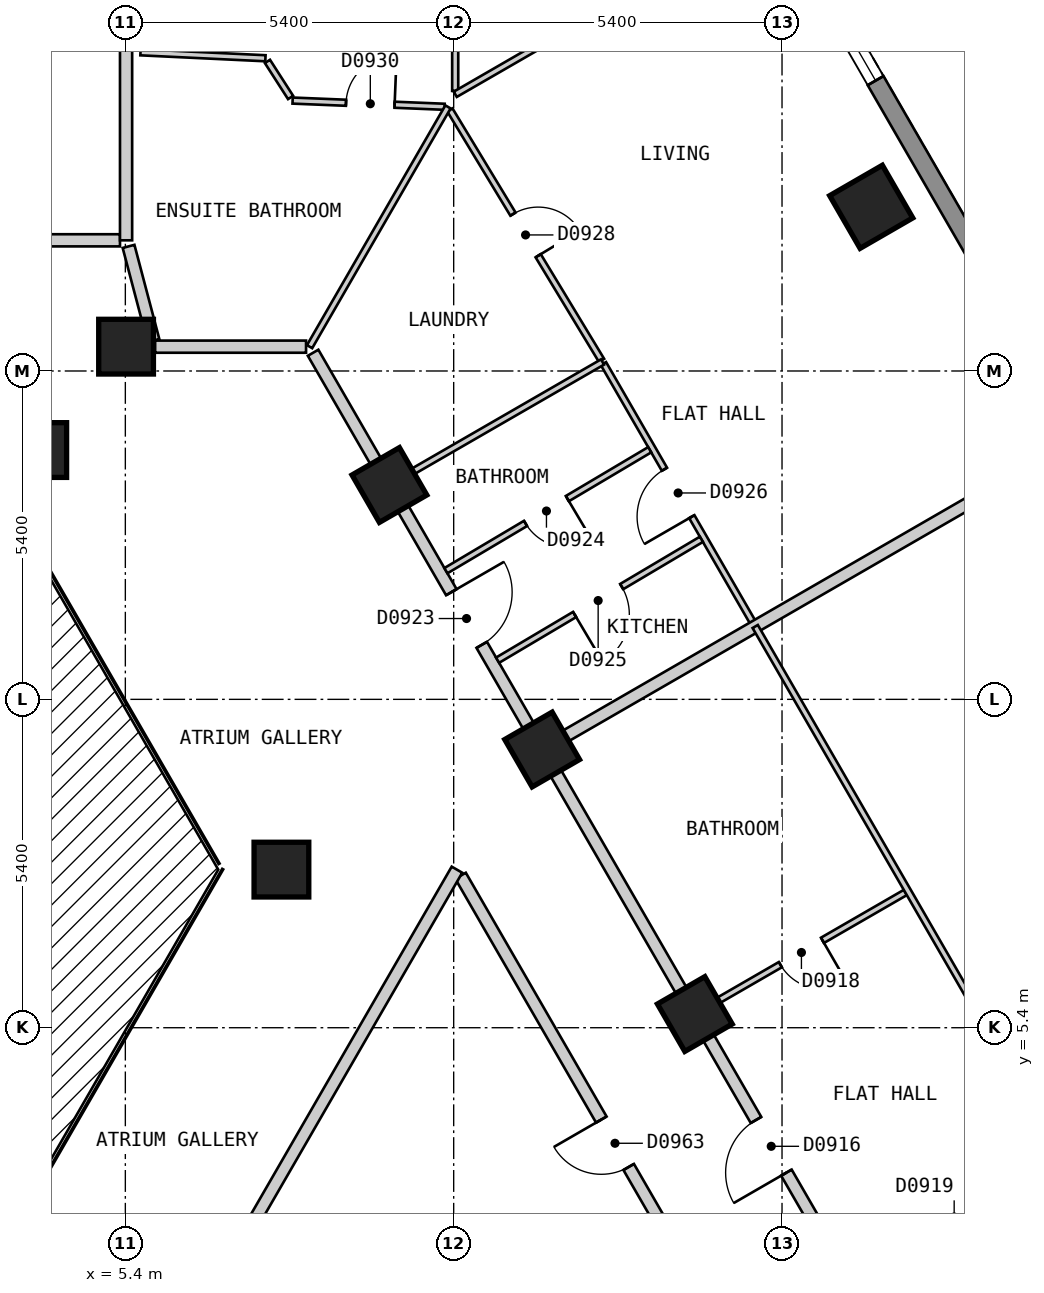
"""IFC4 building model, lengths in metres.
Left out: names, types, materials, properties, quantities, classifications, styles, units other than length and angle.
Written with IfcOpenShell. Run it as: python <this file> out.ifc"""

import sys

from ifc_helpers import new_model, si_unit, direction, frame, frame_2d, origin, origin_2d, place, context, subcontext, project, spatial, polyline, rectangle, outline, extrude, element, fill, save


model = new_model("IFC4")
c1 = context("Model", 3, precision=1e-05, world=origin(), true_north=direction((0.0, 1.0)))
c2 = subcontext(c1, "Body", "Model", "MODEL_VIEW")
j1 = project(units=[si_unit("LENGTHUNIT", "METRE"), si_unit("PLANEANGLEUNIT", "RADIAN")], contexts=[c1])
p1 = place(None, origin())
s1 = spatial("IfcSite", under=j1, at=p1, CompositionType="ELEMENT")
p2 = place(p1, origin())
s2 = spatial("IfcBuilding", under=s1, at=p2, CompositionType="ELEMENT")
p3 = place(p2, frame((0.0, 0.0, 90.0)))
s3 = spatial("IfcBuildingStorey", under=s2, at=p3, CompositionType="ELEMENT", Elevation=90.0)
p4 = place(p3, frame((17.667, 18.9, 0.0), z_axis=(0.0, 0.0, 1.0), x_axis=(-0.5, 0.866025403784, 0.0)))
e1 = element("IfcColumn", 1, at=p4, inside=s3, PredefinedType="COLUMN", context=c2, shape_type="SweptSolid", body=[
    extrude(rectangle(XDim=1.0, YDim=1.0, at=origin_2d()), origin(), (0.0, 0.0, 1.0), 3.0),
])
for number, where, z_axis, x_axis in (
    (2, (14.766, 5.625, 0.0), (0.0, 0.0, 1.0), (-0.5, 0.866, 0.0)),
    (3, (12.255, 9.975, 0.0), (0.0, 0.0, 1.0), (-0.5, 0.866, 0.0)),
    (4, (7.967, 8.0, 0.0), (0.0, 0.0, 1.0), (1.0, 0.0, 0.0)),
    (5, (9.743, 14.325, 0.0), (0.0, 0.0, 1.0), (-0.5, 0.866, 0.0)),
    (6, (5.412, 16.6, 0.0), (0.0, 0.0, 1.0), (-1.0, 0.0, 0.0)),
    (7, (3.984, 14.9, 0.0), (0.0, 0.0, 1.0), (1.0, 0.0, 0.0)),
):
    element("IfcColumn", number, at=place(p3, frame(where, z_axis=z_axis, x_axis=x_axis)), inside=s3, PredefinedType="COLUMN", context=c2, shape_type="SweptSolid", body=[
        extrude(rectangle(XDim=0.9, YDim=0.9, at=origin_2d()), origin(), (0.0, 0.0, 1.0), 3.0),
    ])
p5 = place(p3, frame((29.027, 1.425, 0.0), z_axis=(0.0, 0.0, 1.0), x_axis=(-0.500027479704, 0.866009537788, 0.0)))
e8 = element("IfcWall", 8, at=p5, inside=s3, PredefinedType="SOLIDWALL", context=c2, shape_type="SweptSolid", body=[
    extrude(outline(polyline([(0.0, -0.15), (26.559, -0.15), (26.478, 0.15), (0.08, 0.15), (0.0, -0.15)])), origin(), (0.0, 0.0, 1.0), 2.7),
])
p6 = place(p5, frame((2.483, 0.0, 0.15)))
e9 = element("IfcOpeningElement", 9, at=p6, cuts=e8, PredefinedType="OPENING", context=c2, shape_type="SweptSolid", body=[
    extrude(rectangle(XDim=1.5, YDim=2.1, at=frame_2d((0.75, 1.05))), frame((0.0, 0.16, 0.0), z_axis=(0.0, -1.0, 0.0), x_axis=(1.0, 0.0, 0.0)), (0.0, 0.0, 1.0), 0.32),
])
p7 = place(p5, frame((7.506, 0.0, 0.15)))
e10 = element("IfcOpeningElement", 10, at=p7, cuts=e8, PredefinedType="OPENING", context=c2, shape_type="SweptSolid", body=[
    extrude(rectangle(XDim=1.5, YDim=2.1, at=frame_2d((0.75, 1.05))), frame((0.0, 0.16, 0.0), z_axis=(0.0, -1.0, 0.0), x_axis=(1.0, 0.0, 0.0)), (0.0, 0.0, 1.0), 0.32),
])
p8 = place(p5, frame((12.529, 0.0, 0.15)))
e11 = element("IfcOpeningElement", 11, at=p8, cuts=e8, PredefinedType="OPENING", context=c2, shape_type="SweptSolid", body=[
    extrude(rectangle(XDim=1.5, YDim=2.1, at=frame_2d((0.75, 1.05))), frame((0.0, 0.16, 0.0), z_axis=(0.0, -1.0, 0.0), x_axis=(1.0, 0.0, 0.0)), (0.0, 0.0, 1.0), 0.32),
])
p9 = place(p5, frame((17.552, 0.0, 0.15)))
e12 = element("IfcOpeningElement", 12, at=p9, cuts=e8, PredefinedType="OPENING", context=c2, shape_type="SweptSolid", body=[
    extrude(rectangle(XDim=1.5, YDim=2.1, at=frame_2d((0.75, 1.05))), frame((0.0, 0.16, 0.0), z_axis=(0.0, -1.0, 0.0), x_axis=(1.0, 0.0, 0.0)), (0.0, 0.0, 1.0), 0.32),
])
p10 = place(p5, frame((22.575, 0.0, 0.15)))
e13 = element("IfcOpeningElement", 13, at=p10, cuts=e8, PredefinedType="OPENING", context=c2, shape_type="SweptSolid", body=[
    extrude(rectangle(XDim=1.5, YDim=2.1, at=frame_2d((0.75, 1.05))), frame((0.0, 0.16, 0.0), z_axis=(0.0, -1.0, 0.0), x_axis=(1.0, 0.0, 0.0)), (0.0, 0.0, 1.0), 0.32),
])
p11 = place(p3, frame((5.453, 18.249, 0.0), z_axis=(0.0, 0.0, 1.0), x_axis=(0.255385747764, -0.966839241983, 0.0)))
e14 = element("IfcWall", 14, at=p11, inside=s3, PredefinedType="PARTITIONING", context=c2, shape_type="SweptSolid", body=[
    extrude(rectangle(XDim=1.602, YDim=0.2, at=frame_2d((0.801, 0.0))), origin(), (0.0, 0.0, 1.0), 2.7),
])
p12 = place(p3, frame((10.913, 7.899, 0.0), z_axis=(0.0, 0.0, 1.0), x_axis=(0.500028940566, -0.866008694296, 0.0)))
e15 = element("IfcWall", 15, at=p12, inside=s3, PredefinedType="PARTITIONING", context=c2, shape_type="SweptSolid", body=[
    extrude(rectangle(XDim=10.159, YDim=0.2, at=frame_2d((5.08, 0.0))), origin(), (0.0, 0.0, 1.0), 2.7),
])
p13 = place(p12, frame((4.63, 0.0, 0.0)))
e16 = element("IfcOpeningElement", 16, at=p13, cuts=e15, PredefinedType="OPENING", context=c2, shape_type="SweptSolid", body=[
    extrude(rectangle(XDim=0.9, YDim=2.1, at=frame_2d((0.45, 1.05))), frame((0.0, 0.11, 0.0), z_axis=(0.0, -1.0, 0.0), x_axis=(1.0, 0.0, 0.0)), (0.0, 0.0, 1.0), 0.22),
])
p14 = place(p3, frame((8.488, 16.5, 0.0), z_axis=(0.0, 0.0, 1.0), x_axis=(0.499986836607, -0.86603300354, 0.0)))
e17 = element("IfcWall", 17, at=p14, inside=s3, PredefinedType="PARTITIONING", context=c2, shape_type="SweptSolid", body=[
    extrude(rectangle(XDim=20.09, YDim=0.2, at=frame_2d((10.045, 0.0))), origin(), (0.0, 0.0, 1.0), 2.7),
])
p15 = place(p14, frame((14.569, 0.0, 0.0)))
e18 = element("IfcOpeningElement", 18, at=p15, cuts=e17, PredefinedType="OPENING", context=c2, shape_type="SweptSolid", body=[
    extrude(rectangle(XDim=1.0, YDim=2.1, at=frame_2d((0.5, 1.05))), frame((0.0, 0.11, 0.0), z_axis=(0.0, -1.0, 0.0), x_axis=(1.0, 0.0, 0.0)), (0.0, 0.0, 1.0), 0.22),
])
p16 = place(p14, frame((4.547, 0.0, 0.0)))
e19 = element("IfcOpeningElement", 19, at=p16, cuts=e17, PredefinedType="OPENING", context=c2, shape_type="SweptSolid", body=[
    extrude(rectangle(XDim=1.0, YDim=2.1, at=frame_2d((0.5, 1.05))), frame((0.0, 0.11, 0.0), z_axis=(0.0, -1.0, 0.0), x_axis=(1.0, 0.0, 0.0)), (0.0, 0.0, 1.0), 0.22),
])
p17 = place(p3, frame((5.889, 16.6, 0.0), z_axis=(0.0, 0.0, 1.0), x_axis=(1.0, 0.0, 0.0)))
e20 = element("IfcWall", 20, at=p17, inside=s3, PredefinedType="PARTITIONING", context=c2, shape_type="SweptSolid", body=[
    extrude(rectangle(XDim=2.483, YDim=0.2, at=frame_2d((1.242, 0.0))), origin(), (0.0, 0.0, 1.0), 2.7),
])
p18 = place(p3, frame((1.75, 18.349, 0.0), z_axis=(0.0, 0.0, 1.0), x_axis=(1.0, 0.0, 0.0)))
e21 = element("IfcWall", 21, at=p18, inside=s3, PredefinedType="PARTITIONING", context=c2, shape_type="SweptSolid", body=[
    extrude(rectangle(XDim=3.562, YDim=0.2, at=frame_2d((1.781, 0.0))), origin(), (0.0, 0.0, 1.0), 2.7),
])
p19 = place(p3, frame((6.928, 1.2, 0.0), z_axis=(0.0, 0.0, 1.0), x_axis=(0.500055327065, 0.865993458332, 0.0)))
e22 = element("IfcWall", 22, at=p19, inside=s3, PredefinedType="PARTITIONING", context=c2, shape_type="SweptSolid", body=[
    extrude(rectangle(XDim=7.851, YDim=0.2, at=frame_2d((3.926, 0.0))), origin(), (0.0, 0.0, 1.0), 2.7),
])
p20 = place(p3, frame((7.737, 21.291, 0.0), z_axis=(0.0, 0.0, 1.0), x_axis=(0.540389876456, -0.841414749944, 0.0)))
e23 = element("IfcWall", 23, at=p20, inside=s3, PredefinedType="PARTITIONING", context=c2, shape_type="SweptSolid", body=[
    extrude(rectangle(XDim=0.705, YDim=0.1, at=frame_2d((0.353, 0.0))), origin(), (0.0, 0.0, 1.0), 2.7),
])
p21 = place(p3, frame((10.738, 20.492, 0.0), z_axis=(0.0, 0.0, 1.0), x_axis=(0.518026330534, -0.85536467128, 0.0)))
e24 = element("IfcWall", 24, at=p21, inside=s3, PredefinedType="PARTITIONING", context=c2, shape_type="SweptSolid", body=[
    extrude(rectangle(XDim=4.814, YDim=0.1, at=frame_2d((2.407, 0.0))), origin(), (0.0, 0.0, 1.0), 2.7),
])
p22 = place(p21, frame((2.002, 0.0, 0.0)))
e25 = element("IfcOpeningElement", 25, at=p22, cuts=e24, PredefinedType="OPENING", context=c2, shape_type="SweptSolid", body=[
    extrude(rectangle(XDim=0.8, YDim=2.1, at=frame_2d((0.4, 1.05))), frame((0.0, 0.06, 0.0), z_axis=(0.0, -1.0, 0.0), x_axis=(1.0, 0.0, 0.0)), (0.0, 0.0, 1.0), 0.12),
])
p23 = place(p3, frame((13.263, 16.322, 0.0), z_axis=(0.0, 0.0, 1.0), x_axis=(0.499946798379, -0.866056117576, 0.0)))
e26 = element("IfcWall", 26, at=p23, inside=s3, PredefinedType="PARTITIONING", context=c2, shape_type="SweptSolid", body=[
    extrude(rectangle(XDim=4.993, YDim=0.1, at=frame_2d((2.496, 0.0))), origin(), (0.0, 0.0, 1.0), 2.7),
])
p24 = place(p23, frame((2.007, 0.0, 0.0)))
e27 = element("IfcOpeningElement", 27, at=p24, cuts=e26, PredefinedType="OPENING", context=c2, shape_type="SweptSolid", body=[
    extrude(rectangle(XDim=0.9, YDim=2.1, at=frame_2d((0.45, 1.05))), frame((0.0, 0.06, 0.0), z_axis=(0.0, -1.0, 0.0), x_axis=(1.0, 0.0, 0.0)), (0.0, 0.0, 1.0), 0.12),
])
p25 = place(p3, frame((8.151, 20.647, 0.0), z_axis=(0.0, 0.0, 1.0), x_axis=(0.999167241152, -0.040802257405, 0.0)))
e28 = element("IfcWall", 28, at=p25, inside=s3, PredefinedType="PARTITIONING", context=c2, shape_type="SweptSolid", body=[
    extrude(rectangle(XDim=2.501, YDim=0.1, at=frame_2d((1.25, 0.0))), origin(), (0.0, 0.0, 1.0), 2.7),
])
p26 = place(p25, frame((0.879, 0.0, 0.0)))
e29 = element("IfcOpeningElement", 29, at=p26, cuts=e28, PredefinedType="OPENING", context=c2, shape_type="SweptSolid", body=[
    extrude(rectangle(XDim=0.8, YDim=2.1, at=frame_2d((0.4, 1.05))), frame((0.0, 0.06, 0.0), z_axis=(0.0, -1.0, 0.0), x_axis=(1.0, 0.0, 0.0)), (0.0, 0.0, 1.0), 0.12),
])
p27 = place(p3, frame((5.649, 21.441, 0.0), z_axis=(0.0, 0.0, 1.0), x_axis=(0.998867332207, -0.047582062273, 0.0)))
e30 = element("IfcWall", 30, at=p27, inside=s3, PredefinedType="PARTITIONING", context=c2, shape_type="SweptSolid", body=[
    extrude(rectangle(XDim=2.058, YDim=0.1, at=frame_2d((1.029, 0.0))), origin(), (0.0, 0.0, 1.0), 2.7),
])
p28 = place(p3, frame((8.43, 16.6, 0.0), z_axis=(0.0, 0.0, 1.0), x_axis=(0.499951460778, 0.866053426104, 0.0)))
e31 = element("IfcWall", 31, at=p28, inside=s3, PredefinedType="PARTITIONING", context=c2, shape_type="SweptSolid", body=[
    extrude(rectangle(XDim=4.553, YDim=0.1, at=frame_2d((2.276, 0.0))), origin(), (0.0, 0.0, 1.0), 2.7),
])
p29 = place(p3, frame((10.825, 20.806, 0.0), z_axis=(0.0, 0.0, 1.0), x_axis=(0.0, 1.0, 0.0)))
e32 = element("IfcWall", 32, at=p29, inside=s3, PredefinedType="PARTITIONING", context=c2, shape_type="SweptSolid", body=[
    extrude(rectangle(XDim=5.894, YDim=0.1, at=frame_2d((2.947, 0.0))), origin(), (0.0, 0.0, 1.0), 2.7),
])
p30 = place(p29, frame((2.468, 0.0, 0.0)))
e33 = element("IfcOpeningElement", 33, at=p30, cuts=e32, PredefinedType="OPENING", context=c2, shape_type="SweptSolid", body=[
    extrude(rectangle(XDim=0.9, YDim=2.1, at=frame_2d((0.45, 1.05))), frame((0.0, 0.06, 0.0), z_axis=(0.0, -1.0, 0.0), x_axis=(1.0, 0.0, 0.0)), (0.0, 0.0, 1.0), 0.12),
])
p31 = place(p3, frame((17.365, 1.325, 0.0), z_axis=(0.0, 0.0, 1.0), x_axis=(0.866016855193, 0.500014806302, 0.0)))
e34 = element("IfcWall", 34, at=p31, inside=s3, PredefinedType="PARTITIONING", context=c2, shape_type="SweptSolid", body=[
    extrude(rectangle(XDim=10.0, YDim=0.1, at=frame_2d((5.0, 0.0))), origin(), (0.0, 0.0, 1.0), 2.7),
])
p32 = place(p31, frame((1.474, 0.0, 0.0)))
e35 = element("IfcOpeningElement", 35, at=p32, cuts=e34, PredefinedType="OPENING", context=c2, shape_type="SweptSolid", body=[
    extrude(rectangle(XDim=0.9, YDim=2.1, at=frame_2d((0.45, 1.05))), frame((0.0, 0.06, 0.0), z_axis=(0.0, -1.0, 0.0), x_axis=(1.0, 0.0, 0.0)), (0.0, 0.0, 1.0), 0.12),
])
p33 = place(p31, frame((6.524, 0.0, 0.0)))
e36 = element("IfcOpeningElement", 36, at=p33, cuts=e34, PredefinedType="OPENING", context=c2, shape_type="SweptSolid", body=[
    extrude(rectangle(XDim=0.9, YDim=2.1, at=frame_2d((0.45, 1.05))), frame((0.0, 0.06, 0.0), z_axis=(0.0, -1.0, 0.0), x_axis=(1.0, 0.0, 0.0)), (0.0, 0.0, 1.0), 0.12),
])
p34 = place(p3, frame((14.853, 5.675, 0.0), z_axis=(0.0, 0.0, 1.0), x_axis=(0.865979019114, 0.500080332001, 0.0)))
e37 = element("IfcWall", 37, at=p34, inside=s3, PredefinedType="PARTITIONING", context=c2, shape_type="SweptSolid", body=[
    extrude(rectangle(XDim=3.897, YDim=0.1, at=frame_2d((1.949, 0.0))), origin(), (0.0, 0.0, 1.0), 2.7),
])
p35 = place(p34, frame((1.524, 0.0, 0.0)))
e38 = element("IfcOpeningElement", 38, at=p35, cuts=e37, PredefinedType="OPENING", context=c2, shape_type="SweptSolid", body=[
    extrude(rectangle(XDim=0.8, YDim=2.1, at=frame_2d((0.4, 1.05))), frame((0.0, 0.06, 0.0), z_axis=(0.0, -1.0, 0.0), x_axis=(1.0, 0.0, 0.0)), (0.0, 0.0, 1.0), 0.12),
])
p36 = place(p3, frame((9.83, 14.375, 0.0), z_axis=(0.0, 0.0, 1.0), x_axis=(0.866076396086, 0.499911668341, 0.0)))
e39 = element("IfcWall", 39, at=p36, inside=s3, PredefinedType="PARTITIONING", context=c2, shape_type="SweptSolid", body=[
    extrude(rectangle(XDim=3.947, YDim=0.1, at=frame_2d((1.973, 0.0))), origin(), (0.0, 0.0, 1.0), 2.7),
])
p37 = place(p3, frame((10.826, 20.75, 0.0), z_axis=(0.0, 0.0, 1.0), x_axis=(0.865986712877, 0.50006700863, 0.0)))
e40 = element("IfcWall", 40, at=p37, inside=s3, PredefinedType="PARTITIONING", context=c2, shape_type="SweptSolid", body=[
    extrude(rectangle(XDim=5.949, YDim=0.1, at=frame_2d((2.975, 0.0))), origin(), (0.0, 0.0, 1.0), 2.7),
])
p38 = place(p37, frame((2.524, 0.0, 0.0)))
e41 = element("IfcOpeningElement", 41, at=p38, cuts=e40, PredefinedType="OPENING", context=c2, shape_type="SweptSolid", body=[
    extrude(rectangle(XDim=0.9, YDim=2.1, at=frame_2d((0.45, 1.05))), frame((0.0, 0.06, 0.0), z_axis=(0.0, -1.0, 0.0), x_axis=(1.0, 0.0, 0.0)), (0.0, 0.0, 1.0), 0.12),
])
p39 = place(p3, frame((11.522, 11.444, 0.0), z_axis=(0.0, 0.0, 1.0), x_axis=(0.860134781641, 0.510066816615, 0.0)))
e42 = element("IfcWall", 42, at=p39, inside=s3, PredefinedType="PARTITIONING", context=c2, shape_type="SweptSolid", body=[
    extrude(rectangle(XDim=3.897, YDim=0.1, at=frame_2d((1.949, 0.0))), origin(), (0.0, 0.0, 1.0), 2.7),
])
p40 = place(p39, frame((1.473, 0.0, 0.0)))
e43 = element("IfcOpeningElement", 43, at=p40, cuts=e42, PredefinedType="OPENING", context=c2, shape_type="SweptSolid", body=[
    extrude(rectangle(XDim=0.9, YDim=2.1, at=frame_2d((0.45, 1.05))), frame((0.0, 0.06, 0.0), z_axis=(0.0, -1.0, 0.0), x_axis=(1.0, 0.0, 0.0)), (0.0, 0.0, 1.0), 0.12),
])
p41 = place(p3, frame((10.672, 12.916, 0.0), z_axis=(0.0, 0.0, 1.0), x_axis=(0.859981037235, 0.510325989537, 0.0)))
e44 = element("IfcWall", 44, at=p41, inside=s3, PredefinedType="PARTITIONING", context=c2, shape_type="SweptSolid", body=[
    extrude(rectangle(XDim=3.897, YDim=0.1, at=frame_2d((1.949, 0.0))), origin(), (0.0, 0.0, 1.0), 2.7),
])
p42 = place(p41, frame((1.523, 0.0, 0.0)))
e45 = element("IfcOpeningElement", 45, at=p42, cuts=e44, PredefinedType="OPENING", context=c2, shape_type="SweptSolid", body=[
    extrude(rectangle(XDim=0.8, YDim=2.1, at=frame_2d((0.4, 1.05))), frame((0.0, 0.06, 0.0), z_axis=(0.0, -1.0, 0.0), x_axis=(1.0, 0.0, 0.0)), (0.0, 0.0, 1.0), 0.12),
])
p43 = place(p3, frame((5.412, 18.349, 0.0), z_axis=(0.0, 0.0, 1.0), x_axis=(0.0, 1.0, 0.0)))
e46 = element("IfcWall", 46, at=p43, inside=s3, PredefinedType="PARTITIONING", context=c2, shape_type="SweptSolid", body=[
    extrude(rectangle(XDim=8.351, YDim=0.2, at=frame_2d((4.175, 0.0))), origin(), (0.0, 0.0, 1.0), 2.7),
])
p44 = place(p3, frame((12.342, 10.025, 0.0), z_axis=(0.0, 0.0, 1.0), x_axis=(0.865992435864, 0.500057097767, 0.0)))
e47 = element("IfcWall", 47, at=p44, inside=s3, PredefinedType="PARTITIONING", context=c2, shape_type="SweptSolid", body=[
    extrude(rectangle(XDim=9.999, YDim=0.2, at=frame_2d((5.0, 0.0))), origin(), (0.0, 0.0, 1.0), 2.7),
])
p45 = place(p3, frame((15.759, 11.998, 0.0), z_axis=(0.0, 0.0, 1.0), x_axis=(0.500068444113, -0.865985883951, 0.0)))
e48 = element("IfcWall", 48, at=p45, inside=s3, PredefinedType="PARTITIONING", context=c2, shape_type="SweptSolid", body=[
    extrude(rectangle(XDim=9.997, YDim=0.1, at=frame_2d((4.998, 0.0))), origin(), (0.0, 0.0, 1.0), 2.7),
])
p46 = place(p45, frame((7.074, 0.0, 0.0)))
e49 = element("IfcOpeningElement", 49, at=p46, cuts=e48, PredefinedType="OPENING", context=c2, shape_type="SweptSolid", body=[
    extrude(rectangle(XDim=0.9, YDim=2.1, at=frame_2d((0.45, 1.05))), frame((0.0, 0.06, 0.0), z_axis=(0.0, -1.0, 0.0), x_axis=(1.0, 0.0, 0.0)), (0.0, 0.0, 1.0), 0.12),
])
p47 = place(p10, origin())
e50 = element("IfcWindow", 50, at=p47, inside=s3, PartitioningType="SINGLE_PANEL", PredefinedType="WINDOW", context=c2, shape_type="SweptSolid", body=[
    extrude(rectangle(XDim=1.5, YDim=2.1, at=frame_2d((0.75, 1.05))), frame((0.0, 0.03, 0.0), z_axis=(0.0, -1.0, 0.0), x_axis=(1.0, 0.0, 0.0)), (0.0, 0.0, 1.0), 0.06),
])
fill(e13, e50)
p48 = place(p15, origin())
e51 = element("IfcDoor", 51, at=p48, inside=s3, OperationType="SINGLE_SWING_RIGHT", PredefinedType="DOOR", context=c2, shape_type="SweptSolid", body=[
    extrude(rectangle(XDim=1.0, YDim=2.1, at=frame_2d((0.5, 1.05))), frame((0.0, 0.025, 0.0), z_axis=(0.0, -1.0, 0.0), x_axis=(1.0, 0.0, 0.0)), (0.0, 0.0, 1.0), 0.05),
])
fill(e18, e51)
p49 = place(p35, origin())
e52 = element("IfcDoor", 52, at=p49, inside=s3, OperationType="SINGLE_SWING_RIGHT", PredefinedType="DOOR", context=c2, shape_type="SweptSolid", body=[
    extrude(rectangle(XDim=0.8, YDim=2.1, at=frame_2d((0.4, 1.05))), frame((0.0, 0.025, 0.0), z_axis=(0.0, -1.0, 0.0), x_axis=(1.0, 0.0, 0.0)), (0.0, 0.0, 1.0), 0.05),
])
fill(e38, e52)
p50 = place(p32, origin())
e53 = element("IfcDoor", 53, at=p50, inside=s3, OperationType="SINGLE_SWING_LEFT", PredefinedType="DOOR", context=c2, shape_type="SweptSolid", body=[
    extrude(rectangle(XDim=0.9, YDim=2.1, at=frame_2d((0.45, 1.05))), frame((0.0, 0.025, 0.0), z_axis=(0.0, -1.0, 0.0), x_axis=(1.0, 0.0, 0.0)), (0.0, 0.0, 1.0), 0.05),
])
fill(e35, e53)
p51 = place(p16, origin())
e54 = element("IfcDoor", 54, at=p51, inside=s3, OperationType="SINGLE_SWING_LEFT", PredefinedType="DOOR", context=c2, shape_type="SweptSolid", body=[
    extrude(rectangle(XDim=1.0, YDim=2.1, at=frame_2d((0.5, 1.05))), frame((0.0, 0.025, 0.0), z_axis=(0.0, -1.0, 0.0), x_axis=(1.0, 0.0, 0.0)), (0.0, 0.0, 1.0), 0.05),
])
fill(e19, e54)
p52 = place(p42, origin())
e55 = element("IfcDoor", 55, at=p52, inside=s3, OperationType="SINGLE_SWING_RIGHT", PredefinedType="DOOR", context=c2, shape_type="SweptSolid", body=[
    extrude(rectangle(XDim=0.8, YDim=2.1, at=frame_2d((0.4, 1.05))), frame((0.0, 0.025, 0.0), z_axis=(0.0, -1.0, 0.0), x_axis=(1.0, 0.0, 0.0)), (0.0, 0.0, 1.0), 0.05),
])
fill(e45, e55)
p53 = place(p40, origin())
e56 = element("IfcDoor", 56, at=p53, inside=s3, OperationType="SINGLE_SWING_LEFT", PredefinedType="DOOR", context=c2, shape_type="SweptSolid", body=[
    extrude(rectangle(XDim=0.9, YDim=2.1, at=frame_2d((0.45, 1.05))), frame((0.0, 0.025, 0.0), z_axis=(0.0, -1.0, 0.0), x_axis=(1.0, 0.0, 0.0)), (0.0, 0.0, 1.0), 0.05),
])
fill(e43, e56)
p54 = place(p24, origin())
e57 = element("IfcDoor", 57, at=p54, inside=s3, OperationType="SINGLE_SWING_RIGHT", PredefinedType="DOOR", context=c2, shape_type="SweptSolid", body=[
    extrude(rectangle(XDim=0.9, YDim=2.1, at=frame_2d((0.45, 1.05))), frame((0.0, 0.025, 0.0), z_axis=(0.0, -1.0, 0.0), x_axis=(1.0, 0.0, 0.0)), (0.0, 0.0, 1.0), 0.05),
])
fill(e27, e57)
p55 = place(p22, origin())
e58 = element("IfcDoor", 58, at=p55, inside=s3, OperationType="SINGLE_SWING_RIGHT", PredefinedType="DOOR", context=c2, shape_type="SweptSolid", body=[
    extrude(rectangle(XDim=0.8, YDim=2.1, at=frame_2d((0.4, 1.05))), frame((0.0, 0.025, 0.0), z_axis=(0.0, -1.0, 0.0), x_axis=(1.0, 0.0, 0.0)), (0.0, 0.0, 1.0), 0.05),
])
fill(e25, e58)
p56 = place(p26, origin())
e59 = element("IfcDoor", 59, at=p56, inside=s3, OperationType="SINGLE_SWING_RIGHT", PredefinedType="DOOR", context=c2, shape_type="SweptSolid", body=[
    extrude(rectangle(XDim=0.8, YDim=2.1, at=frame_2d((0.4, 1.05))), frame((0.0, 0.025, 0.0), z_axis=(0.0, -1.0, 0.0), x_axis=(1.0, 0.0, 0.0)), (0.0, 0.0, 1.0), 0.05),
])
fill(e29, e59)
p57 = place(p13, origin())
e60 = element("IfcDoor", 60, at=p57, inside=s3, OperationType="SINGLE_SWING_LEFT", PredefinedType="DOOR", context=c2, shape_type="SweptSolid", body=[
    extrude(rectangle(XDim=0.9, YDim=2.1, at=frame_2d((0.45, 1.05))), frame((0.0, 0.025, 0.0), z_axis=(0.0, -1.0, 0.0), x_axis=(1.0, 0.0, 0.0)), (0.0, 0.0, 1.0), 0.05),
])
fill(e16, e60)
save(model, sys.argv[1])
